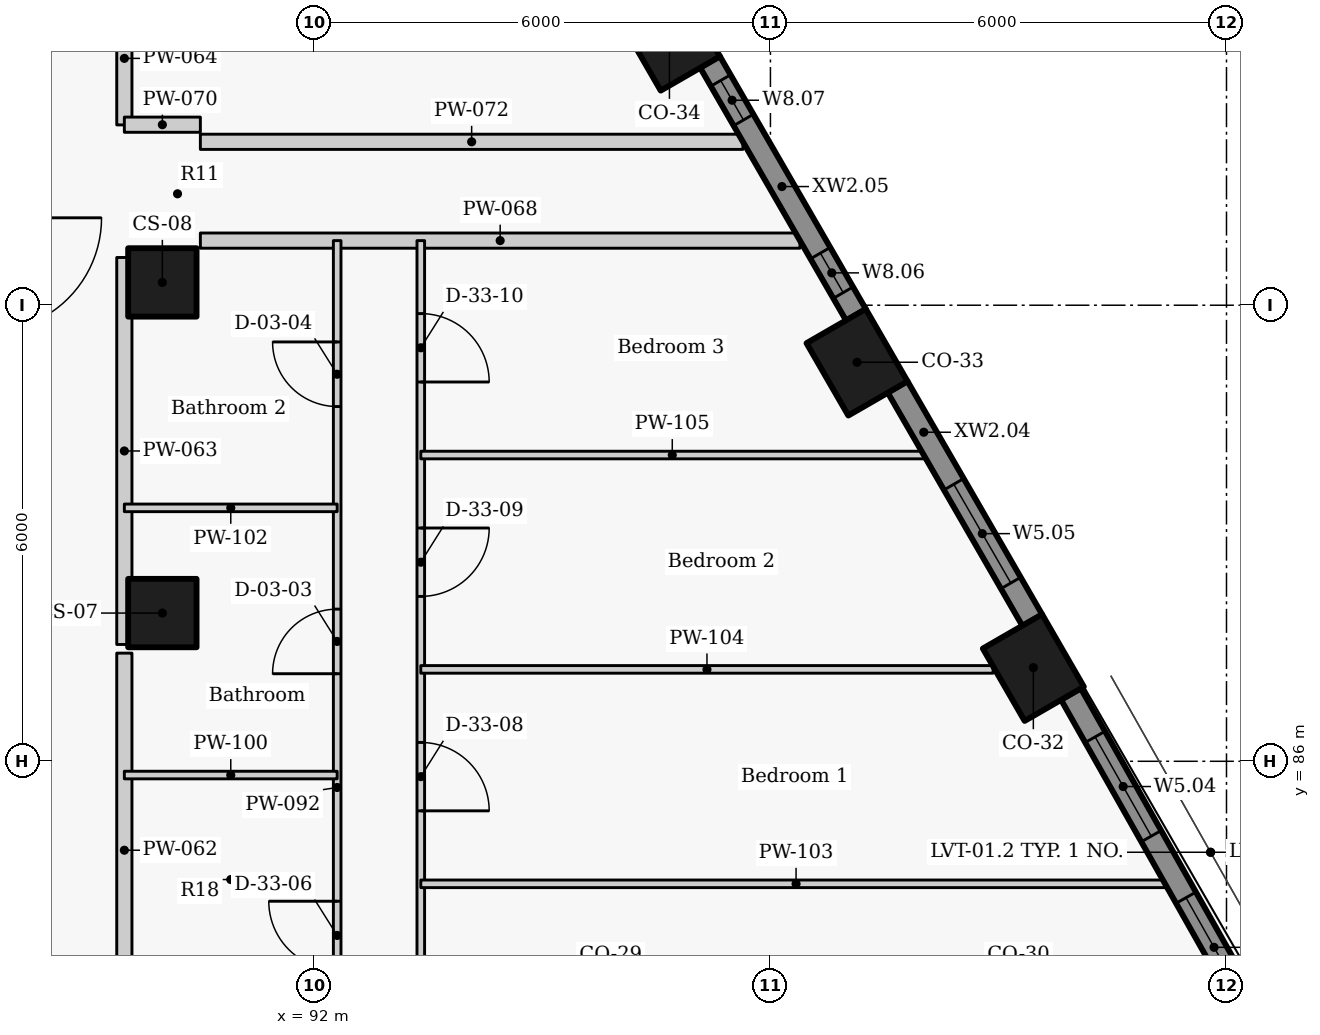
"""IFC4 building model, lengths in metres.
Left out: names, types, materials, properties, quantities, classifications, styles, units other than length and angle.
Written with IfcOpenShell. Run it as: python <this file> out.ifc"""

import sys

from ifc_helpers import new_model, si_unit, direction, frame, frame_2d, origin, origin_2d, place, context, subcontext, project, spatial, rectangle, extrude, element, fill, save


model = new_model("IFC4")
c1 = context("Model", 3, precision=1e-05, world=origin(), true_north=direction((0.0, 1.0)))
c2 = subcontext(c1, "Body", "Model", "MODEL_VIEW")
j1 = project(units=[si_unit("LENGTHUNIT", "METRE"), si_unit("PLANEANGLEUNIT", "RADIAN")], contexts=[c1])
p1 = place(None, origin())
s1 = spatial("IfcSite", under=j1, at=p1, CompositionType="ELEMENT")
p2 = place(p1, origin())
s2 = spatial("IfcBuilding", under=s1, at=p2, CompositionType="ELEMENT")
p3 = place(p2, frame((0.0, 0.0, 229.5)))
s3 = spatial("IfcBuildingStorey", under=s2, at=p3, CompositionType="ELEMENT", Elevation=229.5)
for number, where, z_axis, x_axis in (
    (1, (101.459, 87.232, 0.0), (0.0, 0.0, 1.0), (-0.5, 0.866, 0.0)),
    (2, (99.139, 91.25, 0.0), (0.0, 0.0, 1.0), (-0.5, 0.866, 0.0)),
    (3, (96.671, 95.525, 0.0), (0.0, 0.0, 1.0), (-0.5, 0.866, 0.0)),
):
    element("IfcColumn", number, at=place(p3, frame(where, z_axis=z_axis, x_axis=x_axis)), inside=s3, PredefinedType="COLUMN", context=c2, shape_type="SweptSolid", body=[
        extrude(rectangle(XDim=1.1, YDim=0.9, at=origin_2d()), origin(), (0.0, 0.0, 1.0), 3.3),
    ])
for number, where, z_axis, x_axis in (
    (4, (90.0, 87.95, 0.0), (0.0, 0.0, 1.0), (0.0, 1.0, 0.0)),
    (5, (90.0, 92.3, 0.0), (0.0, 0.0, 1.0), (0.0, 1.0, 0.0)),
):
    element("IfcColumn", number, at=place(p3, frame(where, z_axis=z_axis, x_axis=x_axis)), inside=s3, PredefinedType="COLUMN", context=c2, shape_type="SweptSolid", body=[
        extrude(rectangle(XDim=0.9, YDim=0.9, at=origin_2d()), origin(), (0.0, 0.0, 1.0), 3.3),
    ])
p4 = place(p3, frame((104.627, 82.154, 0.0), z_axis=(0.0, 0.0, 1.0), x_axis=(-0.492080931903, 0.870549456641, 0.0)))
e6 = element("IfcWall", 6, at=p4, inside=s3, PredefinedType="SOLIDWALL", context=c2, shape_type="SweptSolid", body=[
    extrude(rectangle(XDim=5.437, YDim=0.3, at=frame_2d((2.718, 0.0))), origin(), (0.0, 0.0, 1.0), 2.425),
])
p5 = place(p4, frame((0.857, 0.0, 0.9)))
e7 = element("IfcOpeningElement", 7, at=p5, cuts=e6, PredefinedType="OPENING", context=c2, shape_type="SweptSolid", body=[
    extrude(rectangle(XDim=1.5, YDim=1.1, at=frame_2d((0.75, 0.55))), frame((0.0, 0.16, 0.0), z_axis=(0.0, -1.0, 0.0), x_axis=(1.0, 0.0, 0.0)), (0.0, 0.0, 1.0), 0.32),
])
p6 = place(p4, frame((3.287, 0.0, 0.9)))
e8 = element("IfcOpeningElement", 8, at=p6, cuts=e6, PredefinedType="OPENING", context=c2, shape_type="SweptSolid", body=[
    extrude(rectangle(XDim=1.5, YDim=1.1, at=frame_2d((0.75, 0.55))), frame((0.0, 0.16, 0.0), z_axis=(0.0, -1.0, 0.0), x_axis=(1.0, 0.0, 0.0)), (0.0, 0.0, 1.0), 0.32),
])
p7 = place(p3, frame((101.446, 87.855, 0.0), z_axis=(0.0, 0.0, 1.0), x_axis=(-0.500010404316, 0.866019396766, 0.0)))
e9 = element("IfcWall", 9, at=p7, inside=s3, PredefinedType="SOLIDWALL", context=c2, shape_type="SweptSolid", body=[
    extrude(rectangle(XDim=3.547, YDim=0.3, at=frame_2d((1.774, 0.0))), origin(), (0.0, 0.0, 1.0), 2.425),
])
p8 = place(p7, frame((0.566, 0.0, 0.9)))
e10 = element("IfcOpeningElement", 10, at=p8, cuts=e9, PredefinedType="OPENING", context=c2, shape_type="SweptSolid", body=[
    extrude(rectangle(XDim=1.5, YDim=1.1, at=frame_2d((0.75, 0.55))), frame((0.0, 0.16, 0.0), z_axis=(0.0, -1.0, 0.0), x_axis=(1.0, 0.0, 0.0)), (0.0, 0.0, 1.0), 0.32),
])
p9 = place(p3, frame((99.126, 91.873, 0.0), z_axis=(0.0, 0.0, 1.0), x_axis=(-0.499984490703, 0.866034357896, 0.0)))
e11 = element("IfcWall", 11, at=p9, inside=s3, PredefinedType="SOLIDWALL", context=c2, shape_type="SweptSolid", body=[
    extrude(rectangle(XDim=3.844, YDim=0.3, at=frame_2d((1.922, 0.0))), origin(), (0.0, 0.0, 1.0), 2.425),
])
p10 = place(p9, frame((0.338, 0.0, 0.9)))
e12 = element("IfcOpeningElement", 12, at=p10, cuts=e11, PredefinedType="OPENING", context=c2, shape_type="SweptSolid", body=[
    extrude(rectangle(XDim=0.6, YDim=1.1, at=frame_2d((0.3, 0.55))), frame((0.0, 0.16, 0.0), z_axis=(0.0, -1.0, 0.0), x_axis=(1.0, 0.0, 0.0)), (0.0, 0.0, 1.0), 0.32),
])
p11 = place(p9, frame((2.961, 0.0, 0.9)))
e13 = element("IfcOpeningElement", 13, at=p11, cuts=e11, PredefinedType="OPENING", context=c2, shape_type="SweptSolid", body=[
    extrude(rectangle(XDim=0.6, YDim=1.1, at=frame_2d((0.3, 0.55))), frame((0.0, 0.16, 0.0), z_axis=(0.0, -1.0, 0.0), x_axis=(1.0, 0.0, 0.0)), (0.0, 0.0, 1.0), 0.32),
])
p12 = place(p3, frame((89.5, 82.237, 0.0), z_axis=(0.0, 0.0, 1.0), x_axis=(0.0, 1.0, 0.0)))
e14 = element("IfcWall", 14, at=p12, inside=s3, PredefinedType="PARTITIONING", context=c2, shape_type="SweptSolid", body=[
    extrude(rectangle(XDim=5.186, YDim=0.2, at=frame_2d((2.593, 0.0))), origin(), (0.0, 0.0, 1.0), 3.025),
])
p13 = place(p3, frame((89.5, 87.537, 0.0), z_axis=(0.0, 0.0, 1.0), x_axis=(0.0, 1.0, 0.0)))
e15 = element("IfcWall", 15, at=p13, inside=s3, PredefinedType="PARTITIONING", context=c2, shape_type="SweptSolid", body=[
    extrude(rectangle(XDim=5.091, YDim=0.2, at=frame_2d((2.545, 0.0))), origin(), (0.0, 0.0, 1.0), 3.025),
])
p14 = place(p3, frame((89.5, 94.372, 0.0), z_axis=(0.0, 0.0, 1.0), x_axis=(0.0, 1.0, 0.0)))
e16 = element("IfcWall", 16, at=p14, inside=s3, PredefinedType="PARTITIONING", context=c2, shape_type="SweptSolid", body=[
    extrude(rectangle(XDim=1.751, YDim=0.2, at=frame_2d((0.875, 0.0))), origin(), (0.0, 0.0, 1.0), 3.025),
])
p15 = place(p3, frame((90.5, 92.85, 0.0), z_axis=(0.0, 0.0, 1.0), x_axis=(1.0, 0.0, 0.0)))
e17 = element("IfcWall", 17, at=p15, inside=s3, PredefinedType="PARTITIONING", context=c2, shape_type="SweptSolid", body=[
    extrude(rectangle(XDim=7.889, YDim=0.2, at=frame_2d((3.944, 0.0))), origin(), (0.0, 0.0, 1.0), 2.405),
])
p16 = place(p3, frame((89.5, 94.375, 0.0), z_axis=(0.0, 0.0, 1.0), x_axis=(1.0, 0.0, 0.0)))
e18 = element("IfcWall", 18, at=p16, inside=s3, PredefinedType="PARTITIONING", context=c2, shape_type="SweptSolid", body=[
    extrude(rectangle(XDim=1.0, YDim=0.2, at=frame_2d((0.5, 0.0))), origin(), (0.0, 0.0, 1.0), 2.505),
])
p17 = place(p3, frame((90.5, 94.15, 0.0), z_axis=(0.0, 0.0, 1.0), x_axis=(1.0, 0.0, 0.0)))
e19 = element("IfcWall", 19, at=p17, inside=s3, PredefinedType="PARTITIONING", context=c2, shape_type="SweptSolid", body=[
    extrude(rectangle(XDim=7.138, YDim=0.2, at=frame_2d((3.569, 0.0))), origin(), (0.0, 0.0, 1.0), 2.405),
])
p18 = place(p3, frame((92.3, 81.6, 0.0), z_axis=(0.0, 0.0, 1.0), x_axis=(0.0, 1.0, 0.0)))
e20 = element("IfcWall", 20, at=p18, inside=s3, PredefinedType="PARTITIONING", context=c2, shape_type="SweptSolid", body=[
    extrude(rectangle(XDim=11.25, YDim=0.1, at=frame_2d((5.625, 0.0))), origin(), (0.0, 0.0, 1.0), 3.025),
])
p19 = place(p18, frame((1.659, 0.0, 0.0)))
e21 = element("IfcOpeningElement", 21, at=p19, cuts=e20, PredefinedType="OPENING", context=c2, shape_type="SweptSolid", body=[
    extrude(rectangle(XDim=0.9, YDim=2.1, at=frame_2d((0.45, 1.05))), frame((0.0, 0.06, 0.0), z_axis=(0.0, -1.0, 0.0), x_axis=(1.0, 0.0, 0.0)), (0.0, 0.0, 1.0), 0.12),
])
p20 = place(p18, frame((5.552, 0.0, 0.0)))
e22 = element("IfcOpeningElement", 22, at=p20, cuts=e20, PredefinedType="OPENING", context=c2, shape_type="SweptSolid", body=[
    extrude(rectangle(XDim=0.85, YDim=2.1, at=frame_2d((0.425, 1.05))), frame((0.0, 0.06, 0.0), z_axis=(0.0, -1.0, 0.0), x_axis=(1.0, 0.0, 0.0)), (0.0, 0.0, 1.0), 0.12),
])
p21 = place(p18, frame((9.067, 0.0, 0.0)))
e23 = element("IfcOpeningElement", 23, at=p21, cuts=e20, PredefinedType="OPENING", context=c2, shape_type="SweptSolid", body=[
    extrude(rectangle(XDim=0.85, YDim=2.1, at=frame_2d((0.425, 1.05))), frame((0.0, 0.06, 0.0), z_axis=(0.0, -1.0, 0.0), x_axis=(1.0, 0.0, 0.0)), (0.0, 0.0, 1.0), 0.12),
])
p22 = place(p3, frame((93.4, 92.85, 0.0), z_axis=(0.0, 0.0, 1.0), x_axis=(0.0, -1.0, 0.0)))
e24 = element("IfcWall", 24, at=p22, inside=s3, PredefinedType="PARTITIONING", context=c2, shape_type="SweptSolid", body=[
    extrude(rectangle(XDim=26.75, YDim=0.1, at=frame_2d((13.375, 0.0))), origin(), (0.0, 0.0, 1.0), 3.025),
])
p23 = place(p22, frame((23.927, 0.0, 0.0)))
e25 = element("IfcOpeningElement", 25, at=p23, cuts=e24, PredefinedType="OPENING", context=c2, shape_type="SweptSolid", body=[
    extrude(rectangle(XDim=0.9, YDim=2.1, at=frame_2d((0.45, 1.05))), frame((0.0, 0.06, 0.0), z_axis=(0.0, -1.0, 0.0), x_axis=(1.0, 0.0, 0.0)), (0.0, 0.0, 1.0), 0.12),
])
p24 = place(p22, frame((20.028, 0.0, 0.0)))
e26 = element("IfcOpeningElement", 26, at=p24, cuts=e24, PredefinedType="OPENING", context=c2, shape_type="SweptSolid", body=[
    extrude(rectangle(XDim=0.9, YDim=2.1, at=frame_2d((0.45, 1.05))), frame((0.0, 0.06, 0.0), z_axis=(0.0, -1.0, 0.0), x_axis=(1.0, 0.0, 0.0)), (0.0, 0.0, 1.0), 0.12),
])
p25 = place(p22, frame((16.977, 0.0, 0.0)))
e27 = element("IfcOpeningElement", 27, at=p25, cuts=e24, PredefinedType="OPENING", context=c2, shape_type="SweptSolid", body=[
    extrude(rectangle(XDim=0.9, YDim=2.1, at=frame_2d((0.45, 1.05))), frame((0.0, 0.06, 0.0), z_axis=(0.0, -1.0, 0.0), x_axis=(1.0, 0.0, 0.0)), (0.0, 0.0, 1.0), 0.12),
])
p26 = place(p22, frame((13.926, 0.0, 0.0)))
e28 = element("IfcOpeningElement", 28, at=p26, cuts=e24, PredefinedType="OPENING", context=c2, shape_type="SweptSolid", body=[
    extrude(rectangle(XDim=0.9, YDim=2.1, at=frame_2d((0.45, 1.05))), frame((0.0, 0.06, 0.0), z_axis=(0.0, -1.0, 0.0), x_axis=(1.0, 0.0, 0.0)), (0.0, 0.0, 1.0), 0.12),
])
p27 = place(p22, frame((10.206, 0.0, 0.0)))
e29 = element("IfcOpeningElement", 29, at=p27, cuts=e24, PredefinedType="OPENING", context=c2, shape_type="SweptSolid", body=[
    extrude(rectangle(XDim=0.9, YDim=2.1, at=frame_2d((0.45, 1.05))), frame((0.0, 0.06, 0.0), z_axis=(0.0, -1.0, 0.0), x_axis=(1.0, 0.0, 0.0)), (0.0, 0.0, 1.0), 0.12),
])
p28 = place(p22, frame((6.602, 0.0, 0.0)))
e30 = element("IfcOpeningElement", 30, at=p28, cuts=e24, PredefinedType="OPENING", context=c2, shape_type="SweptSolid", body=[
    extrude(rectangle(XDim=0.9, YDim=2.1, at=frame_2d((0.45, 1.05))), frame((0.0, 0.06, 0.0), z_axis=(0.0, -1.0, 0.0), x_axis=(1.0, 0.0, 0.0)), (0.0, 0.0, 1.0), 0.12),
])
p29 = place(p22, frame((3.781, 0.0, 0.0)))
e31 = element("IfcOpeningElement", 31, at=p29, cuts=e24, PredefinedType="OPENING", context=c2, shape_type="SweptSolid", body=[
    extrude(rectangle(XDim=0.9, YDim=2.1, at=frame_2d((0.45, 1.05))), frame((0.0, 0.06, 0.0), z_axis=(0.0, -1.0, 0.0), x_axis=(1.0, 0.0, 0.0)), (0.0, 0.0, 1.0), 0.12),
])
p30 = place(p22, frame((0.96, 0.0, 0.0)))
e32 = element("IfcOpeningElement", 32, at=p30, cuts=e24, PredefinedType="OPENING", context=c2, shape_type="SweptSolid", body=[
    extrude(rectangle(XDim=0.9, YDim=2.1, at=frame_2d((0.45, 1.05))), frame((0.0, 0.06, 0.0), z_axis=(0.0, -1.0, 0.0), x_axis=(1.0, 0.0, 0.0)), (0.0, 0.0, 1.0), 0.12),
])
for number, where, z_axis, x_axis in (
    (33, (89.5, 85.819, 0.0), (0.0, 0.0, 1.0), (1.0, 0.0, 0.0)),
    (34, (89.5, 89.334, 0.0), (0.0, 0.0, 1.0), (1.0, 0.0, 0.0)),
):
    element("IfcWall", number, at=place(p3, frame(where, z_axis=z_axis, x_axis=x_axis)), inside=s3, PredefinedType="PARTITIONING", context=c2, shape_type="SweptSolid", body=[
        extrude(rectangle(XDim=2.8, YDim=0.1, at=frame_2d((1.4, 0.0))), origin(), (0.0, 0.0, 1.0), 2.505),
    ])
p31 = place(p3, frame((93.4, 84.388, 0.0), z_axis=(0.0, 0.0, 1.0), x_axis=(1.0, 0.0, 0.0)))
e35 = element("IfcWall", 35, at=p31, inside=s3, PredefinedType="PARTITIONING", context=c2, shape_type="SweptSolid", body=[
    extrude(rectangle(XDim=9.875, YDim=0.1, at=frame_2d((4.937, 0.0))), origin(), (0.0, 0.0, 1.0), 2.405),
])
p32 = place(p3, frame((93.4, 87.209, 0.0), z_axis=(0.0, 0.0, 1.0), x_axis=(1.0, 0.0, 0.0)))
e36 = element("IfcWall", 36, at=p32, inside=s3, PredefinedType="PARTITIONING", context=c2, shape_type="SweptSolid", body=[
    extrude(rectangle(XDim=7.53, YDim=0.1, at=frame_2d((3.765, 0.0))), origin(), (0.0, 0.0, 1.0), 3.025),
])
p33 = place(p3, frame((93.4, 90.029, 0.0), z_axis=(0.0, 0.0, 1.0), x_axis=(1.0, 0.0, 0.0)))
e37 = element("IfcWall", 37, at=p33, inside=s3, PredefinedType="PARTITIONING", context=c2, shape_type="SweptSolid", body=[
    extrude(rectangle(XDim=6.617, YDim=0.1, at=frame_2d((3.309, 0.0))), origin(), (0.0, 0.0, 1.0), 2.405),
])
p34 = place(p5, origin())
e38 = element("IfcWindow", 38, at=p34, inside=s3, PartitioningType="SINGLE_PANEL", PredefinedType="WINDOW", context=c2, shape_type="SweptSolid", body=[
    extrude(rectangle(XDim=1.5, YDim=1.1, at=frame_2d((0.75, 0.55))), frame((0.0, 0.03, 0.0), z_axis=(0.0, -1.0, 0.0), x_axis=(1.0, 0.0, 0.0)), (0.0, 0.0, 1.0), 0.06),
])
fill(e7, e38)
p35 = place(p6, origin())
e39 = element("IfcWindow", 39, at=p35, inside=s3, PartitioningType="SINGLE_PANEL", PredefinedType="WINDOW", context=c2, shape_type="SweptSolid", body=[
    extrude(rectangle(XDim=1.5, YDim=1.1, at=frame_2d((0.75, 0.55))), frame((0.0, 0.03, 0.0), z_axis=(0.0, -1.0, 0.0), x_axis=(1.0, 0.0, 0.0)), (0.0, 0.0, 1.0), 0.06),
])
fill(e8, e39)
p36 = place(p8, origin())
e40 = element("IfcWindow", 40, at=p36, inside=s3, PartitioningType="SINGLE_PANEL", PredefinedType="WINDOW", context=c2, shape_type="SweptSolid", body=[
    extrude(rectangle(XDim=1.5, YDim=1.1, at=frame_2d((0.75, 0.55))), frame((0.0, 0.03, 0.0), z_axis=(0.0, -1.0, 0.0), x_axis=(1.0, 0.0, 0.0)), (0.0, 0.0, 1.0), 0.06),
])
fill(e10, e40)
p37 = place(p10, origin())
e41 = element("IfcWindow", 41, at=p37, inside=s3, PartitioningType="SINGLE_PANEL", PredefinedType="WINDOW", context=c2, shape_type="SweptSolid", body=[
    extrude(rectangle(XDim=0.6, YDim=1.1, at=frame_2d((0.3, 0.55))), frame((0.0, 0.03, 0.0), z_axis=(0.0, -1.0, 0.0), x_axis=(1.0, 0.0, 0.0)), (0.0, 0.0, 1.0), 0.06),
])
fill(e12, e41)
p38 = place(p11, origin())
e42 = element("IfcWindow", 42, at=p38, inside=s3, PartitioningType="SINGLE_PANEL", PredefinedType="WINDOW", context=c2, shape_type="SweptSolid", body=[
    extrude(rectangle(XDim=0.6, YDim=1.1, at=frame_2d((0.3, 0.55))), frame((0.0, 0.03, 0.0), z_axis=(0.0, -1.0, 0.0), x_axis=(1.0, 0.0, 0.0)), (0.0, 0.0, 1.0), 0.06),
])
fill(e13, e42)
p39 = place(p19, origin())
e43 = element("IfcDoor", 43, at=p39, inside=s3, OperationType="SINGLE_SWING_RIGHT", PredefinedType="DOOR", context=c2, shape_type="SweptSolid", body=[
    extrude(rectangle(XDim=0.9, YDim=2.1, at=frame_2d((0.45, 1.05))), frame((0.0, 0.025, 0.0), z_axis=(0.0, -1.0, 0.0), x_axis=(1.0, 0.0, 0.0)), (0.0, 0.0, 1.0), 0.05),
])
fill(e21, e43)
p40 = place(p20, origin())
e44 = element("IfcDoor", 44, at=p40, inside=s3, OperationType="SINGLE_SWING_LEFT", PredefinedType="DOOR", context=c2, shape_type="SweptSolid", body=[
    extrude(rectangle(XDim=0.85, YDim=2.1, at=frame_2d((0.425, 1.05))), frame((0.0, 0.025, 0.0), z_axis=(0.0, -1.0, 0.0), x_axis=(1.0, 0.0, 0.0)), (0.0, 0.0, 1.0), 0.05),
])
fill(e22, e44)
p41 = place(p21, origin())
e45 = element("IfcDoor", 45, at=p41, inside=s3, OperationType="SINGLE_SWING_RIGHT", PredefinedType="DOOR", context=c2, shape_type="SweptSolid", body=[
    extrude(rectangle(XDim=0.85, YDim=2.1, at=frame_2d((0.425, 1.05))), frame((0.0, 0.025, 0.0), z_axis=(0.0, -1.0, 0.0), x_axis=(1.0, 0.0, 0.0)), (0.0, 0.0, 1.0), 0.05),
])
fill(e23, e45)
p42 = place(p28, origin())
e46 = element("IfcDoor", 46, at=p42, inside=s3, OperationType="SINGLE_SWING_RIGHT", PredefinedType="DOOR", context=c2, shape_type="SweptSolid", body=[
    extrude(rectangle(XDim=0.9, YDim=2.1, at=frame_2d((0.45, 1.05))), frame((0.0, 0.025, 0.0), z_axis=(0.0, -1.0, 0.0), x_axis=(1.0, 0.0, 0.0)), (0.0, 0.0, 1.0), 0.05),
])
fill(e30, e46)
p43 = place(p29, origin())
e47 = element("IfcDoor", 47, at=p43, inside=s3, OperationType="SINGLE_SWING_LEFT", PredefinedType="DOOR", context=c2, shape_type="SweptSolid", body=[
    extrude(rectangle(XDim=0.9, YDim=2.1, at=frame_2d((0.45, 1.05))), frame((0.0, 0.025, 0.0), z_axis=(0.0, -1.0, 0.0), x_axis=(1.0, 0.0, 0.0)), (0.0, 0.0, 1.0), 0.05),
])
fill(e31, e47)
p44 = place(p30, origin())
e48 = element("IfcDoor", 48, at=p44, inside=s3, OperationType="SINGLE_SWING_RIGHT", PredefinedType="DOOR", context=c2, shape_type="SweptSolid", body=[
    extrude(rectangle(XDim=0.9, YDim=2.1, at=frame_2d((0.45, 1.05))), frame((0.0, 0.025, 0.0), z_axis=(0.0, -1.0, 0.0), x_axis=(1.0, 0.0, 0.0)), (0.0, 0.0, 1.0), 0.05),
])
fill(e32, e48)
save(model, sys.argv[1])
